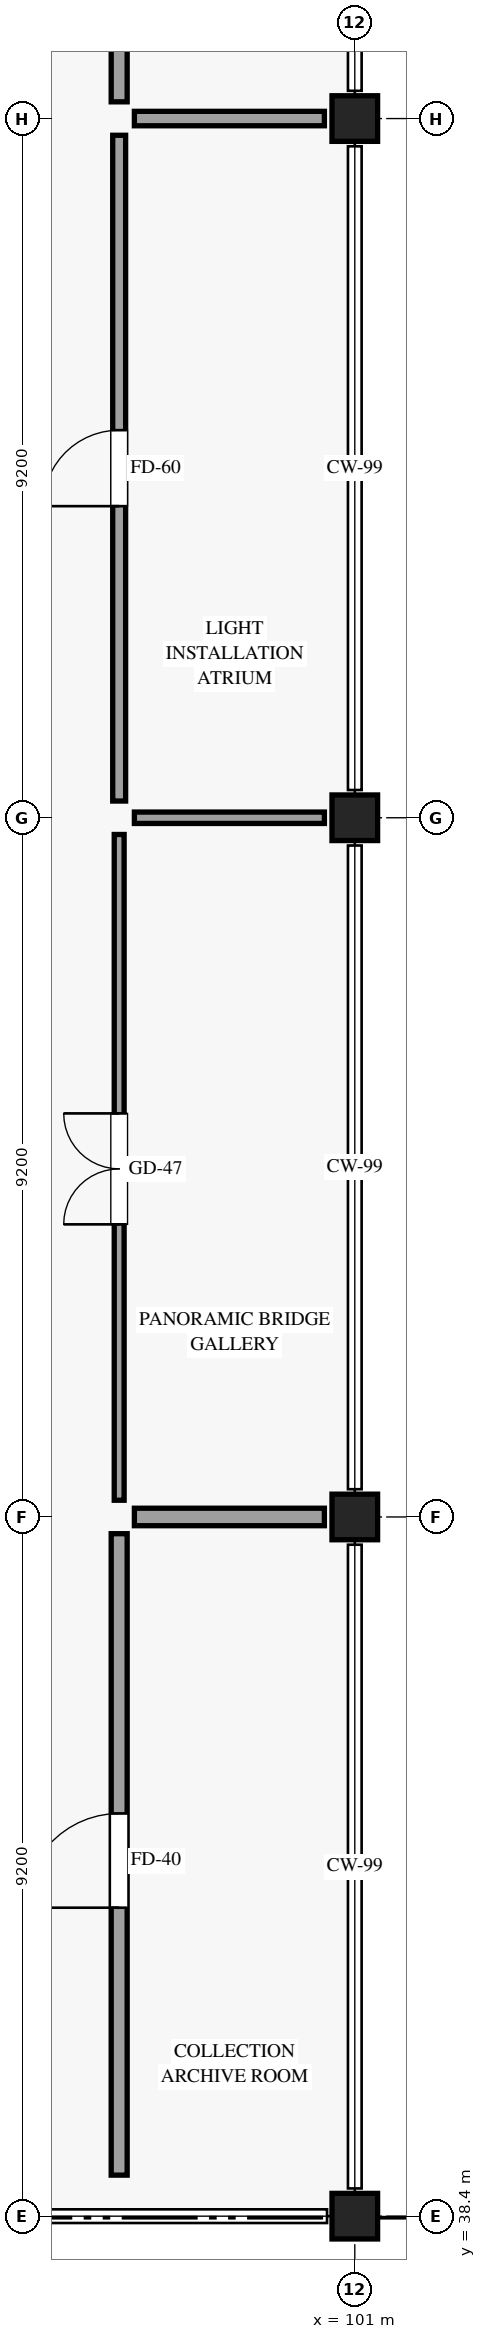
"""IFC4 building model, lengths in metres.
Left out: names, types, materials, properties, quantities, classifications, styles, units other than length and angle.
Written with IfcOpenShell. Run it as: python <this file> out.ifc"""

import sys

from ifc_helpers import new_model, si_unit, direction, frame, frame_2d, origin, origin_2d, place, context, subcontext, project, spatial, rectangle, extrude, element, fill, save


model = new_model("IFC4")
c1 = context("Model", 3, precision=1e-05, world=origin(), true_north=direction((0.0, 1.0)))
c2 = subcontext(c1, "Body", "Model", "MODEL_VIEW")
j1 = project(units=[si_unit("LENGTHUNIT", "METRE"), si_unit("PLANEANGLEUNIT", "RADIAN")], contexts=[c1])
p1 = place(None, origin())
s1 = spatial("IfcSite", under=j1, at=p1, CompositionType="ELEMENT")
p2 = place(p1, origin())
s2 = spatial("IfcBuilding", under=s1, at=p2, CompositionType="ELEMENT")
p3 = place(p2, frame((0.0, 0.0, 10.2)))
s3 = spatial("IfcBuildingStorey", under=s2, at=p3, CompositionType="ELEMENT", Elevation=10.2)
for number, where, z_axis, x_axis in (
    (1, (101.0, 38.4, 0.0), (0.0, 0.0, 1.0), (1.0, 0.0, 0.0)),
    (2, (101.0, 47.6, 0.0), (0.0, 0.0, 1.0), (1.0, 0.0, 0.0)),
    (3, (101.0, 56.8, 0.0), (0.0, 0.0, 1.0), (1.0, 0.0, 0.0)),
    (4, (101.0, 66.0, 0.0), (0.0, 0.0, 1.0), (1.0, 0.0, 0.0)),
):
    element("IfcColumn", number, at=place(p3, frame(where, z_axis=z_axis, x_axis=x_axis)), inside=s3, PredefinedType="COLUMN", context=c2, shape_type="SweptSolid", body=[
        extrude(rectangle(XDim=0.6, YDim=0.6, at=origin_2d()), origin(), (0.0, 0.0, 1.0), 4.8),
    ])
p4 = place(p3, frame((97.9, 38.94, 0.0), z_axis=(0.0, 0.0, 1.0), x_axis=(0.0, 1.0, 0.0)))
e5 = element("IfcWall", 5, at=p4, inside=s3, PredefinedType="PARTITIONING", context=c2, shape_type="SweptSolid", body=[
    extrude(rectangle(XDim=8.44, YDim=0.21, at=frame_2d((4.22, 0.0))), origin(), (0.0, 0.0, 1.0), 3.925),
])
p5 = place(p4, frame((3.519, 0.0, 0.0)))
e6 = element("IfcOpeningElement", 6, at=p5, cuts=e5, PredefinedType="OPENING", context=c2, shape_type="SweptSolid", body=[
    extrude(rectangle(XDim=1.24, YDim=2.32, at=frame_2d((0.62, 1.16))), frame((0.0, 0.115, 0.0), z_axis=(0.0, -1.0, 0.0), x_axis=(1.0, 0.0, 0.0)), (0.0, 0.0, 1.0), 0.23),
])
p6 = place(p3, frame((98.1, 47.6, 0.0), z_axis=(0.0, 0.0, 1.0), x_axis=(1.0, 0.0, 0.0)))
e7 = element("IfcWall", 7, at=p6, inside=s3, PredefinedType="PARTITIONING", context=c2, shape_type="SweptSolid", body=[
    extrude(rectangle(XDim=2.5, YDim=0.23, at=frame_2d((1.25, 0.0))), origin(), (0.0, 0.0, 1.0), 3.925),
])
p7 = place(p3, frame((97.9, 47.82, 0.0), z_axis=(0.0, 0.0, 1.0), x_axis=(0.0, 1.0, 0.0)))
e8 = element("IfcWall", 8, at=p7, inside=s3, PredefinedType="PARTITIONING", context=c2, shape_type="SweptSolid", body=[
    extrude(rectangle(XDim=8.76, YDim=0.13, at=frame_2d((4.38, 0.0))), origin(), (0.0, 0.0, 1.0), 3.925),
])
p8 = place(p7, frame((3.63, 0.0, 0.0)))
e9 = element("IfcOpeningElement", 9, at=p8, cuts=e8, PredefinedType="OPENING", context=c2, shape_type="SweptSolid", body=[
    extrude(rectangle(XDim=1.46, YDim=2.32, at=frame_2d((0.73, 1.16))), frame((0.0, 0.075, 0.0), z_axis=(0.0, -1.0, 0.0), x_axis=(1.0, 0.0, 0.0)), (0.0, 0.0, 1.0), 0.15),
])
p9 = place(p3, frame((98.1, 56.8, 0.0), z_axis=(0.0, 0.0, 1.0), x_axis=(1.0, 0.0, 0.0)))
e10 = element("IfcWall", 10, at=p9, inside=s3, PredefinedType="PARTITIONING", context=c2, shape_type="SweptSolid", body=[
    extrude(rectangle(XDim=2.5, YDim=0.15, at=frame_2d((1.25, 0.0))), origin(), (0.0, 0.0, 1.0), 3.925),
])
p10 = place(p3, frame((97.9, 57.02, 0.0), z_axis=(0.0, 0.0, 1.0), x_axis=(0.0, 1.0, 0.0)))
e11 = element("IfcWall", 11, at=p10, inside=s3, PredefinedType="PARTITIONING", context=c2, shape_type="SweptSolid", body=[
    extrude(rectangle(XDim=8.76, YDim=0.17, at=frame_2d((4.38, 0.0))), origin(), (0.0, 0.0, 1.0), 3.925),
])
p11 = place(p10, frame((3.88, 0.0, 0.0)))
e12 = element("IfcOpeningElement", 12, at=p11, cuts=e11, PredefinedType="OPENING", context=c2, shape_type="SweptSolid", body=[
    extrude(rectangle(XDim=1.0, YDim=2.2, at=frame_2d((0.5, 1.1))), frame((0.0, 0.095, 0.0), z_axis=(0.0, -1.0, 0.0), x_axis=(1.0, 0.0, 0.0)), (0.0, 0.0, 1.0), 0.19),
])
p12 = place(p3, frame((98.1, 66.0, 0.0), z_axis=(0.0, 0.0, 1.0), x_axis=(1.0, 0.0, 0.0)))
e13 = element("IfcWall", 13, at=p12, inside=s3, PredefinedType="PARTITIONING", context=c2, shape_type="SweptSolid", body=[
    extrude(rectangle(XDim=2.5, YDim=0.19, at=frame_2d((1.25, 0.0))), origin(), (0.0, 0.0, 1.0), 3.925),
])
p13 = place(p3, frame((97.9, 66.22, 0.0), z_axis=(0.0, 0.0, 1.0), x_axis=(0.0, 1.0, 0.0)))
e14 = element("IfcWall", 14, at=p13, inside=s3, PredefinedType="PARTITIONING", context=c2, shape_type="SweptSolid", body=[
    extrude(rectangle(XDim=17.96, YDim=0.21, at=frame_2d((8.98, 0.0))), origin(), (0.0, 0.0, 1.0), 3.925),
])
p14 = place(p13, frame((3.936, 0.0, 0.0)))
e15 = element("IfcOpeningElement", 15, at=p14, cuts=e14, PredefinedType="OPENING", context=c2, shape_type="SweptSolid", body=[
    extrude(rectangle(XDim=1.08, YDim=2.24, at=frame_2d((0.54, 1.12))), frame((0.0, 0.115, 0.0), z_axis=(0.0, -1.0, 0.0), x_axis=(1.0, 0.0, 0.0)), (0.0, 0.0, 1.0), 0.23),
])
p15 = place(p5, origin())
e16 = element("IfcDoor", 16, at=p15, inside=s3, OperationType="SINGLE_SWING_LEFT", PredefinedType="DOOR", context=c2, shape_type="SweptSolid", body=[
    extrude(rectangle(XDim=1.24, YDim=2.32, at=frame_2d((0.62, 1.16))), frame((0.0, 0.025, 0.0), z_axis=(0.0, -1.0, 0.0), x_axis=(1.0, 0.0, 0.0)), (0.0, 0.0, 1.0), 0.05),
])
fill(e6, e16)
p16 = place(p8, origin())
e17 = element("IfcDoor", 17, at=p16, inside=s3, OperationType="DOUBLE_DOOR_SINGLE_SWING", PredefinedType="DOOR", context=c2, shape_type="SweptSolid", body=[
    extrude(rectangle(XDim=1.46, YDim=2.32, at=frame_2d((0.73, 1.16))), frame((0.0, 0.025, 0.0), z_axis=(0.0, -1.0, 0.0), x_axis=(1.0, 0.0, 0.0)), (0.0, 0.0, 1.0), 0.05),
])
fill(e9, e17)
p17 = place(p11, origin())
e18 = element("IfcDoor", 18, at=p17, inside=s3, OperationType="SINGLE_SWING_LEFT", PredefinedType="DOOR", context=c2, shape_type="SweptSolid", body=[
    extrude(rectangle(XDim=1.0, YDim=2.2, at=frame_2d((0.5, 1.1))), frame((0.0, 0.025, 0.0), z_axis=(0.0, -1.0, 0.0), x_axis=(1.0, 0.0, 0.0)), (0.0, 0.0, 1.0), 0.05),
])
fill(e12, e18)
save(model, sys.argv[1])
